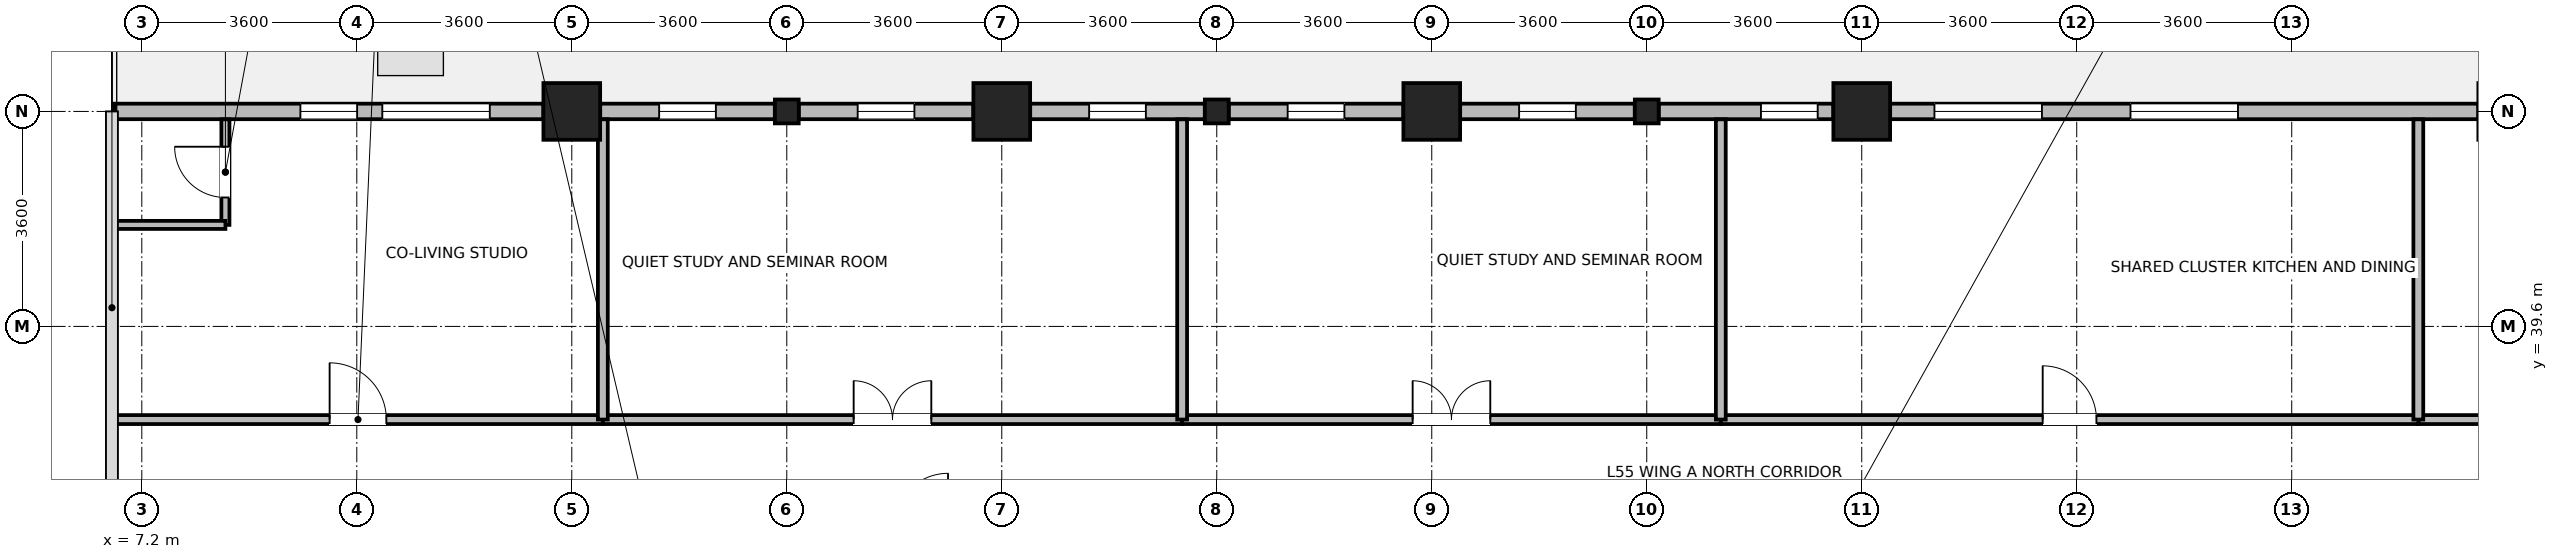
"""IFC4 building model, lengths in metres.
Left out: names, types, materials, properties, quantities, classifications, styles, units other than length and angle.
Written with IfcOpenShell. Run it as: python <this file> out.ifc"""

import sys

from ifc_helpers import new_model, si_unit, direction, frame, frame_2d, origin, origin_2d, place, context, subcontext, project, spatial, rectangle, i_section, extrude, source, transform, mapped, element, fill, save


model = new_model("IFC4")
c1 = context("Model", 3, precision=1e-05, world=origin(), true_north=direction((0.0, 1.0)))
c2 = subcontext(c1, "Body", "Model", "MODEL_VIEW")
j1 = project(units=[si_unit("LENGTHUNIT", "METRE"), si_unit("PLANEANGLEUNIT", "RADIAN")], contexts=[c1])
p1 = place(None, origin())
s1 = spatial("IfcSite", under=j1, at=p1, CompositionType="ELEMENT")
p2 = place(p1, origin())
s2 = spatial("IfcBuilding", under=s1, at=p2, CompositionType="ELEMENT")
p3 = place(p2, frame((0.0, 0.0, 216.6)))
s3 = spatial("IfcBuildingStorey", under=s2, at=p3, CompositionType="ELEMENT", Elevation=216.6)
m1 = source(origin(), c2, "Body", "SweptSolid", [
    extrude(rectangle(XDim=0.95, YDim=0.95, at=origin_2d()), origin(), (0.0, 0.0, 1.0), 3.7),
])
for number, where, z_axis, x_axis in (
    (1, (14.4, 43.2, 0.0), (0.0, 0.0, 1.0), (1.0, 0.0, 0.0)),
    (2, (21.6, 43.2, 0.0), (0.0, 0.0, 1.0), (1.0, 0.0, 0.0)),
    (3, (28.8, 43.2, 0.0), (0.0, 0.0, 1.0), (1.0, 0.0, 0.0)),
    (4, (36.0, 43.2, 0.0), (0.0, 0.0, 1.0), (1.0, 0.0, 0.0)),
):
    element("IfcColumn", number, at=place(p3, frame(where, z_axis=z_axis, x_axis=x_axis)), inside=s3, PredefinedType="COLUMN", context=c2, shape_type="MappedRepresentation", body=[
        mapped(m1, transform((0.0, 0.0, 0.0), x_axis=(1.0, 0.0, 0.0), y_axis=(0.0, 1.0, 0.0), z_axis=(0.0, 0.0, 1.0), scale=1.0)),
    ])
m2 = source(origin(), c2, "Body", "SweptSolid", [
    extrude(i_section(OverallWidth=0.399, OverallDepth=0.4, WebThickness=0.017, FlangeThickness=0.023, FilletRadius=0.015, at=origin_2d()), origin(), (0.0, 0.0, 1.0), 3.7),
])
for number, where, z_axis, x_axis in (
    (5, (18.0, 43.2, 0.0), (0.0, 0.0, 1.0), (1.0, 0.0, 0.0)),
    (6, (25.2, 43.2, 0.0), (0.0, 0.0, 1.0), (1.0, 0.0, 0.0)),
    (7, (32.4, 43.2, 0.0), (0.0, 0.0, 1.0), (1.0, 0.0, 0.0)),
):
    element("IfcColumn", number, at=place(p3, frame(where, z_axis=z_axis, x_axis=x_axis)), inside=s3, PredefinedType="COLUMN", context=c2, shape_type="MappedRepresentation", body=[
        mapped(m2, transform((0.0, 0.0, 0.0), x_axis=(1.0, 0.0, 0.0), y_axis=(0.0, 1.0, 0.0), z_axis=(0.0, 0.0, 1.0), scale=1.0)),
    ])
p4 = place(p3, frame((36.476, 43.2, 0.0), z_axis=(0.0, 0.0, 1.0), x_axis=(1.0, 0.0, 0.0)))
e8 = element("IfcWall", 8, at=p4, inside=s3, PredefinedType="STANDARD", context=c2, shape_type="SweptSolid", body=[
    extrude(rectangle(XDim=9.848, YDim=0.26, at=frame_2d((4.924, 0.0))), origin(), (0.0, 0.0, 1.0), 3.05),
])
p5 = place(p4, frame((0.741, 0.0, 0.85)))
e9 = element("IfcOpeningElement", 9, at=p5, cuts=e8, PredefinedType="OPENING", context=c2, shape_type="SweptSolid", body=[
    extrude(rectangle(XDim=1.8, YDim=1.85, at=frame_2d((0.9, 0.925))), frame((0.0, 0.14, 0.0), z_axis=(0.0, -1.0, 0.0), x_axis=(1.0, 0.0, 0.0)), (0.0, 0.0, 1.0), 0.28),
])
p6 = place(p4, frame((4.024, 0.0, 0.85)))
e10 = element("IfcOpeningElement", 10, at=p6, cuts=e8, PredefinedType="OPENING", context=c2, shape_type="SweptSolid", body=[
    extrude(rectangle(XDim=1.8, YDim=1.85, at=frame_2d((0.9, 0.925))), frame((0.0, 0.14, 0.0), z_axis=(0.0, -1.0, 0.0), x_axis=(1.0, 0.0, 0.0)), (0.0, 0.0, 1.0), 0.28),
])
p7 = place(p3, frame((32.601, 43.2, 0.0), z_axis=(0.0, 0.0, 1.0), x_axis=(1.0, 0.0, 0.0)))
e11 = element("IfcWall", 11, at=p7, inside=s3, PredefinedType="STANDARD", context=c2, shape_type="SweptSolid", body=[
    extrude(rectangle(XDim=2.923, YDim=0.26, at=frame_2d((1.462, 0.0))), origin(), (0.0, 0.0, 1.0), 3.05),
])
p8 = place(p7, frame((1.712, 0.0, 0.85)))
e12 = element("IfcOpeningElement", 12, at=p8, cuts=e11, PredefinedType="OPENING", context=c2, shape_type="SweptSolid", body=[
    extrude(rectangle(XDim=0.95, YDim=1.75, at=frame_2d((0.475, 0.875))), frame((0.0, 0.14, 0.0), z_axis=(0.0, -1.0, 0.0), x_axis=(1.0, 0.0, 0.0)), (0.0, 0.0, 1.0), 0.28),
])
p9 = place(p3, frame((29.276, 43.2, 0.0), z_axis=(0.0, 0.0, 1.0), x_axis=(1.0, 0.0, 0.0)))
e13 = element("IfcWall", 13, at=p9, inside=s3, PredefinedType="STANDARD", context=c2, shape_type="SweptSolid", body=[
    extrude(rectangle(XDim=2.924, YDim=0.26, at=frame_2d((1.462, 0.0))), origin(), (0.0, 0.0, 1.0), 3.05),
])
p10 = place(p9, frame((0.987, 0.0, 0.85)))
e14 = element("IfcOpeningElement", 14, at=p10, cuts=e13, PredefinedType="OPENING", context=c2, shape_type="SweptSolid", body=[
    extrude(rectangle(XDim=0.95, YDim=1.75, at=frame_2d((0.475, 0.875))), frame((0.0, 0.14, 0.0), z_axis=(0.0, -1.0, 0.0), x_axis=(1.0, 0.0, 0.0)), (0.0, 0.0, 1.0), 0.28),
])
p11 = place(p3, frame((25.4, 43.2, 0.0), z_axis=(0.0, 0.0, 1.0), x_axis=(1.0, 0.0, 0.0)))
e15 = element("IfcWall", 15, at=p11, inside=s3, PredefinedType="STANDARD", context=c2, shape_type="SweptSolid", body=[
    extrude(rectangle(XDim=2.924, YDim=0.26, at=frame_2d((1.462, 0.0))), origin(), (0.0, 0.0, 1.0), 3.05),
])
p12 = place(p11, frame((0.987, 0.0, 0.85)))
e16 = element("IfcOpeningElement", 16, at=p12, cuts=e15, PredefinedType="OPENING", context=c2, shape_type="SweptSolid", body=[
    extrude(rectangle(XDim=0.95, YDim=1.75, at=frame_2d((0.475, 0.875))), frame((0.0, 0.14, 0.0), z_axis=(0.0, -1.0, 0.0), x_axis=(1.0, 0.0, 0.0)), (0.0, 0.0, 1.0), 0.28),
])
p13 = place(p3, frame((22.076, 43.2, 0.0), z_axis=(0.0, 0.0, 1.0), x_axis=(1.0, 0.0, 0.0)))
e17 = element("IfcWall", 17, at=p13, inside=s3, PredefinedType="STANDARD", context=c2, shape_type="SweptSolid", body=[
    extrude(rectangle(XDim=2.924, YDim=0.26, at=frame_2d((1.462, 0.0))), origin(), (0.0, 0.0, 1.0), 3.05),
])
p14 = place(p13, frame((0.987, 0.0, 0.85)))
e18 = element("IfcOpeningElement", 18, at=p14, cuts=e17, PredefinedType="OPENING", context=c2, shape_type="SweptSolid", body=[
    extrude(rectangle(XDim=0.95, YDim=1.75, at=frame_2d((0.475, 0.875))), frame((0.0, 0.14, 0.0), z_axis=(0.0, -1.0, 0.0), x_axis=(1.0, 0.0, 0.0)), (0.0, 0.0, 1.0), 0.28),
])
p15 = place(p3, frame((18.2, 43.2, 0.0), z_axis=(0.0, 0.0, 1.0), x_axis=(1.0, 0.0, 0.0)))
e19 = element("IfcWall", 19, at=p15, inside=s3, PredefinedType="STANDARD", context=c2, shape_type="SweptSolid", body=[
    extrude(rectangle(XDim=2.924, YDim=0.26, at=frame_2d((1.462, 0.0))), origin(), (0.0, 0.0, 1.0), 3.05),
])
p16 = place(p15, frame((0.987, 0.0, 0.85)))
e20 = element("IfcOpeningElement", 20, at=p16, cuts=e19, PredefinedType="OPENING", context=c2, shape_type="SweptSolid", body=[
    extrude(rectangle(XDim=0.95, YDim=1.75, at=frame_2d((0.475, 0.875))), frame((0.0, 0.14, 0.0), z_axis=(0.0, -1.0, 0.0), x_axis=(1.0, 0.0, 0.0)), (0.0, 0.0, 1.0), 0.28),
])
p17 = place(p3, frame((14.876, 43.2, 0.0), z_axis=(0.0, 0.0, 1.0), x_axis=(1.0, 0.0, 0.0)))
e21 = element("IfcWall", 21, at=p17, inside=s3, PredefinedType="STANDARD", context=c2, shape_type="SweptSolid", body=[
    extrude(rectangle(XDim=2.924, YDim=0.26, at=frame_2d((1.462, 0.0))), origin(), (0.0, 0.0, 1.0), 3.05),
])
p18 = place(p17, frame((0.987, 0.0, 0.85)))
e22 = element("IfcOpeningElement", 22, at=p18, cuts=e21, PredefinedType="OPENING", context=c2, shape_type="SweptSolid", body=[
    extrude(rectangle(XDim=0.95, YDim=1.75, at=frame_2d((0.475, 0.875))), frame((0.0, 0.14, 0.0), z_axis=(0.0, -1.0, 0.0), x_axis=(1.0, 0.0, 0.0)), (0.0, 0.0, 1.0), 0.28),
])
p19 = place(p3, frame((6.737, 43.2, 0.0), z_axis=(0.0, 0.0, 1.0), x_axis=(1.0, 0.0, 0.0)))
e23 = element("IfcWall", 23, at=p19, inside=s3, PredefinedType="STANDARD", context=c2, shape_type="SweptSolid", body=[
    extrude(rectangle(XDim=7.187, YDim=0.26, at=frame_2d((3.594, 0.0))), origin(), (0.0, 0.0, 1.0), 3.45),
])
p20 = place(p19, frame((4.49, 0.0, 0.85)))
e24 = element("IfcOpeningElement", 24, at=p20, cuts=e23, PredefinedType="OPENING", context=c2, shape_type="SweptSolid", body=[
    extrude(rectangle(XDim=1.8, YDim=1.85, at=frame_2d((0.9, 0.925))), frame((0.0, 0.14, 0.0), z_axis=(0.0, -1.0, 0.0), x_axis=(1.0, 0.0, 0.0)), (0.0, 0.0, 1.0), 0.28),
])
p21 = place(p19, frame((3.118, 0.0, 0.85)))
e25 = element("IfcOpeningElement", 25, at=p21, cuts=e23, PredefinedType="OPENING", context=c2, shape_type="SweptSolid", body=[
    extrude(rectangle(XDim=0.95, YDim=1.75, at=frame_2d((0.475, 0.875))), frame((0.0, 0.14, 0.0), z_axis=(0.0, -1.0, 0.0), x_axis=(1.0, 0.0, 0.0)), (0.0, 0.0, 1.0), 0.28),
])
p22 = place(p3, frame((8.6, 41.3, 0.0), z_axis=(0.0, 0.0, 1.0), x_axis=(0.0, 1.0, 0.0)))
e26 = element("IfcWall", 26, at=p22, inside=s3, PredefinedType="PARTITIONING", context=c2, shape_type="SweptSolid", body=[
    extrude(rectangle(XDim=1.768, YDim=0.135, at=frame_2d((0.884, 0.0))), origin(), (0.0, 0.0, 1.0), 3.45),
])
p23 = place(p22, frame((0.459, 0.0, 0.0)))
e27 = element("IfcOpeningElement", 27, at=p23, cuts=e26, PredefinedType="OPENING", context=c2, shape_type="SweptSolid", body=[
    extrude(rectangle(XDim=0.85, YDim=2.04, at=frame_2d((0.425, 1.02))), frame((0.0, 0.078, 0.0), z_axis=(0.0, -1.0, 0.0), x_axis=(1.0, 0.0, 0.0)), (0.0, 0.0, 1.0), 0.155),
])
p24 = place(p3, frame((6.72, 41.3, 0.0), z_axis=(0.0, 0.0, 1.0), x_axis=(1.0, 0.0, 0.0)))
e28 = element("IfcWall", 28, at=p24, inside=s3, PredefinedType="PARTITIONING", context=c2, shape_type="SweptSolid", body=[
    extrude(rectangle(XDim=1.88, YDim=0.135, at=frame_2d((0.94, 0.0))), origin(), (0.0, 0.0, 1.0), 3.45),
])
p25 = place(p3, frame((45.32, 38.04, 0.0), z_axis=(0.0, 0.0, 1.0), x_axis=(1.0, 0.0, 0.0)))
e29 = element("IfcWall", 29, at=p25, inside=s3, PredefinedType="PARTITIONING", context=c2, shape_type="SweptSolid", body=[
    extrude(rectangle(XDim=13.52, YDim=0.15, at=frame_2d((6.76, 0.0))), origin(), (0.0, 0.0, 1.0), 3.45),
])
p26 = place(p25, frame((6.11, 0.0, 0.0)))
e30 = element("IfcOpeningElement", 30, at=p26, cuts=e29, PredefinedType="OPENING", context=c2, shape_type="SweptSolid", body=[
    extrude(rectangle(XDim=1.3, YDim=2.12, at=frame_2d((0.65, 1.06))), frame((0.0, 0.085, 0.0), z_axis=(0.0, -1.0, 0.0), x_axis=(1.0, 0.0, 0.0)), (0.0, 0.0, 1.0), 0.17),
])
p27 = place(p3, frame((33.64, 38.04, 0.0), z_axis=(0.0, 0.0, 1.0), x_axis=(1.0, 0.0, 0.0)))
e31 = element("IfcWall", 31, at=p27, inside=s3, PredefinedType="PARTITIONING", context=c2, shape_type="SweptSolid", body=[
    extrude(rectangle(XDim=11.68, YDim=0.15, at=frame_2d((5.84, 0.0))), origin(), (0.0, 0.0, 1.0), 3.45),
])
p28 = place(p27, frame((5.39, 0.0, 0.0)))
e32 = element("IfcOpeningElement", 32, at=p28, cuts=e31, PredefinedType="OPENING", context=c2, shape_type="SweptSolid", body=[
    extrude(rectangle(XDim=0.9, YDim=2.08, at=frame_2d((0.45, 1.04))), frame((0.0, 0.085, 0.0), z_axis=(0.0, -1.0, 0.0), x_axis=(1.0, 0.0, 0.0)), (0.0, 0.0, 1.0), 0.17),
])
p29 = place(p3, frame((14.92, 38.04, 0.0), z_axis=(0.0, 0.0, 1.0), x_axis=(1.0, 0.0, 0.0)))
e33 = element("IfcWall", 33, at=p29, inside=s3, PredefinedType="PARTITIONING", context=c2, shape_type="SweptSolid", body=[
    extrude(rectangle(XDim=9.7, YDim=0.15, at=frame_2d((4.85, 0.0))), origin(), (0.0, 0.0, 1.0), 3.45),
])
p30 = place(p29, frame((4.2, 0.0, 0.0)))
e34 = element("IfcOpeningElement", 34, at=p30, cuts=e33, PredefinedType="OPENING", context=c2, shape_type="SweptSolid", body=[
    extrude(rectangle(XDim=1.3, YDim=2.12, at=frame_2d((0.65, 1.06))), frame((0.0, 0.085, 0.0), z_axis=(0.0, -1.0, 0.0), x_axis=(1.0, 0.0, 0.0)), (0.0, 0.0, 1.0), 0.17),
])
p31 = place(p3, frame((24.62, 38.04, 0.0), z_axis=(0.0, 0.0, 1.0), x_axis=(1.0, 0.0, 0.0)))
e35 = element("IfcWall", 35, at=p31, inside=s3, PredefinedType="PARTITIONING", context=c2, shape_type="SweptSolid", body=[
    extrude(rectangle(XDim=9.02, YDim=0.15, at=frame_2d((4.51, 0.0))), origin(), (0.0, 0.0, 1.0), 3.45),
])
p32 = place(p31, frame((3.86, 0.0, 0.0)))
e36 = element("IfcOpeningElement", 36, at=p32, cuts=e35, PredefinedType="OPENING", context=c2, shape_type="SweptSolid", body=[
    extrude(rectangle(XDim=1.3, YDim=2.12, at=frame_2d((0.65, 1.06))), frame((0.0, 0.085, 0.0), z_axis=(0.0, -1.0, 0.0), x_axis=(1.0, 0.0, 0.0)), (0.0, 0.0, 1.0), 0.17),
])
p33 = place(p3, frame((6.72, 38.04, 0.0), z_axis=(0.0, 0.0, 1.0), x_axis=(1.0, 0.0, 0.0)))
e37 = element("IfcWall", 37, at=p33, inside=s3, PredefinedType="PARTITIONING", context=c2, shape_type="SweptSolid", body=[
    extrude(rectangle(XDim=8.2, YDim=0.15, at=frame_2d((4.1, 0.0))), origin(), (0.0, 0.0, 1.0), 3.45),
])
p34 = place(p33, frame((3.625, 0.0, 0.0)))
e38 = element("IfcOpeningElement", 38, at=p34, cuts=e37, PredefinedType="OPENING", context=c2, shape_type="SweptSolid", body=[
    extrude(rectangle(XDim=0.95, YDim=2.1, at=frame_2d((0.475, 1.05))), frame((0.0, 0.085, 0.0), z_axis=(0.0, -1.0, 0.0), x_axis=(1.0, 0.0, 0.0)), (0.0, 0.0, 1.0), 0.17),
])
for number, where, z_axis, x_axis in (
    (39, (14.92, 38.04, 0.0), (0.0, 0.0, 1.0), (0.0, 1.0, 0.0)),
    (40, (24.62, 38.04, 0.0), (0.0, 0.0, 1.0), (0.0, 1.0, 0.0)),
    (41, (33.64, 38.04, 0.0), (0.0, 0.0, 1.0), (0.0, 1.0, 0.0)),
    (42, (45.32, 38.04, 0.0), (0.0, 0.0, 1.0), (0.0, 1.0, 0.0)),
):
    element("IfcWall", number, at=place(p3, frame(where, z_axis=z_axis, x_axis=x_axis)), inside=s3, PredefinedType="PARTITIONING", context=c2, shape_type="SweptSolid", body=[
        extrude(rectangle(XDim=5.028, YDim=0.165, at=frame_2d((2.514, 0.0))), origin(), (0.0, 0.0, 1.0), 3.45),
    ])
p35 = place(p5, origin())
e43 = element("IfcWindow", 43, at=p35, inside=s3, PartitioningType="SINGLE_PANEL", PredefinedType="WINDOW", context=c2, shape_type="SweptSolid", body=[
    extrude(rectangle(XDim=1.8, YDim=1.85, at=frame_2d((0.9, 0.925))), frame((0.0, 0.03, 0.0), z_axis=(0.0, -1.0, 0.0), x_axis=(1.0, 0.0, 0.0)), (0.0, 0.0, 1.0), 0.06),
])
fill(e9, e43)
p36 = place(p6, origin())
e44 = element("IfcWindow", 44, at=p36, inside=s3, PartitioningType="SINGLE_PANEL", PredefinedType="WINDOW", context=c2, shape_type="SweptSolid", body=[
    extrude(rectangle(XDim=1.8, YDim=1.85, at=frame_2d((0.9, 0.925))), frame((0.0, 0.03, 0.0), z_axis=(0.0, -1.0, 0.0), x_axis=(1.0, 0.0, 0.0)), (0.0, 0.0, 1.0), 0.06),
])
fill(e10, e44)
p37 = place(p8, origin())
e45 = element("IfcWindow", 45, at=p37, inside=s3, PartitioningType="SINGLE_PANEL", PredefinedType="WINDOW", context=c2, shape_type="SweptSolid", body=[
    extrude(rectangle(XDim=0.95, YDim=1.75, at=frame_2d((0.475, 0.875))), frame((0.0, 0.03, 0.0), z_axis=(0.0, -1.0, 0.0), x_axis=(1.0, 0.0, 0.0)), (0.0, 0.0, 1.0), 0.06),
])
fill(e12, e45)
p38 = place(p10, origin())
e46 = element("IfcWindow", 46, at=p38, inside=s3, PartitioningType="SINGLE_PANEL", PredefinedType="WINDOW", context=c2, shape_type="SweptSolid", body=[
    extrude(rectangle(XDim=0.95, YDim=1.75, at=frame_2d((0.475, 0.875))), frame((0.0, 0.03, 0.0), z_axis=(0.0, -1.0, 0.0), x_axis=(1.0, 0.0, 0.0)), (0.0, 0.0, 1.0), 0.06),
])
fill(e14, e46)
p39 = place(p12, origin())
e47 = element("IfcWindow", 47, at=p39, inside=s3, PartitioningType="SINGLE_PANEL", PredefinedType="WINDOW", context=c2, shape_type="SweptSolid", body=[
    extrude(rectangle(XDim=0.95, YDim=1.75, at=frame_2d((0.475, 0.875))), frame((0.0, 0.03, 0.0), z_axis=(0.0, -1.0, 0.0), x_axis=(1.0, 0.0, 0.0)), (0.0, 0.0, 1.0), 0.06),
])
fill(e16, e47)
p40 = place(p14, origin())
e48 = element("IfcWindow", 48, at=p40, inside=s3, PartitioningType="SINGLE_PANEL", PredefinedType="WINDOW", context=c2, shape_type="SweptSolid", body=[
    extrude(rectangle(XDim=0.95, YDim=1.75, at=frame_2d((0.475, 0.875))), frame((0.0, 0.03, 0.0), z_axis=(0.0, -1.0, 0.0), x_axis=(1.0, 0.0, 0.0)), (0.0, 0.0, 1.0), 0.06),
])
fill(e18, e48)
p41 = place(p16, origin())
e49 = element("IfcWindow", 49, at=p41, inside=s3, PartitioningType="SINGLE_PANEL", PredefinedType="WINDOW", context=c2, shape_type="SweptSolid", body=[
    extrude(rectangle(XDim=0.95, YDim=1.75, at=frame_2d((0.475, 0.875))), frame((0.0, 0.03, 0.0), z_axis=(0.0, -1.0, 0.0), x_axis=(1.0, 0.0, 0.0)), (0.0, 0.0, 1.0), 0.06),
])
fill(e20, e49)
p42 = place(p18, origin())
e50 = element("IfcWindow", 50, at=p42, inside=s3, PartitioningType="SINGLE_PANEL", PredefinedType="WINDOW", context=c2, shape_type="SweptSolid", body=[
    extrude(rectangle(XDim=0.95, YDim=1.75, at=frame_2d((0.475, 0.875))), frame((0.0, 0.03, 0.0), z_axis=(0.0, -1.0, 0.0), x_axis=(1.0, 0.0, 0.0)), (0.0, 0.0, 1.0), 0.06),
])
fill(e22, e50)
p43 = place(p20, origin())
e51 = element("IfcWindow", 51, at=p43, inside=s3, PartitioningType="SINGLE_PANEL", PredefinedType="WINDOW", context=c2, shape_type="SweptSolid", body=[
    extrude(rectangle(XDim=1.8, YDim=1.85, at=frame_2d((0.9, 0.925))), frame((0.0, 0.03, 0.0), z_axis=(0.0, -1.0, 0.0), x_axis=(1.0, 0.0, 0.0)), (0.0, 0.0, 1.0), 0.06),
])
fill(e24, e51)
p44 = place(p21, origin())
e52 = element("IfcWindow", 52, at=p44, inside=s3, PartitioningType="SINGLE_PANEL", PredefinedType="WINDOW", context=c2, shape_type="SweptSolid", body=[
    extrude(rectangle(XDim=0.95, YDim=1.75, at=frame_2d((0.475, 0.875))), frame((0.0, 0.03, 0.0), z_axis=(0.0, -1.0, 0.0), x_axis=(1.0, 0.0, 0.0)), (0.0, 0.0, 1.0), 0.06),
])
fill(e25, e52)
p45 = place(p23, origin())
e53 = element("IfcDoor", 53, at=p45, inside=s3, OperationType="SINGLE_SWING_RIGHT", PredefinedType="DOOR", context=c2, shape_type="SweptSolid", body=[
    extrude(rectangle(XDim=0.85, YDim=2.04, at=frame_2d((0.425, 1.02))), frame((0.0, 0.025, 0.0), z_axis=(0.0, -1.0, 0.0), x_axis=(1.0, 0.0, 0.0)), (0.0, 0.0, 1.0), 0.05),
])
fill(e27, e53)
p46 = place(p28, origin())
e54 = element("IfcDoor", 54, at=p46, inside=s3, OperationType="SINGLE_SWING_LEFT", PredefinedType="DOOR", context=c2, shape_type="SweptSolid", body=[
    extrude(rectangle(XDim=0.9, YDim=2.08, at=frame_2d((0.45, 1.04))), frame((0.0, 0.025, 0.0), z_axis=(0.0, -1.0, 0.0), x_axis=(1.0, 0.0, 0.0)), (0.0, 0.0, 1.0), 0.05),
])
fill(e32, e54)
p47 = place(p30, origin())
e55 = element("IfcDoor", 55, at=p47, inside=s3, OperationType="DOUBLE_DOOR_SINGLE_SWING", PredefinedType="DOOR", context=c2, shape_type="SweptSolid", body=[
    extrude(rectangle(XDim=1.3, YDim=2.12, at=frame_2d((0.65, 1.06))), frame((0.0, 0.025, 0.0), z_axis=(0.0, -1.0, 0.0), x_axis=(1.0, 0.0, 0.0)), (0.0, 0.0, 1.0), 0.05),
])
fill(e34, e55)
p48 = place(p32, origin())
e56 = element("IfcDoor", 56, at=p48, inside=s3, OperationType="DOUBLE_DOOR_SINGLE_SWING", PredefinedType="DOOR", context=c2, shape_type="SweptSolid", body=[
    extrude(rectangle(XDim=1.3, YDim=2.12, at=frame_2d((0.65, 1.06))), frame((0.0, 0.025, 0.0), z_axis=(0.0, -1.0, 0.0), x_axis=(1.0, 0.0, 0.0)), (0.0, 0.0, 1.0), 0.05),
])
fill(e36, e56)
p49 = place(p34, origin())
e57 = element("IfcDoor", 57, at=p49, inside=s3, OperationType="SINGLE_SWING_LEFT", PredefinedType="DOOR", context=c2, shape_type="SweptSolid", body=[
    extrude(rectangle(XDim=0.95, YDim=2.1, at=frame_2d((0.475, 1.05))), frame((0.0, 0.025, 0.0), z_axis=(0.0, -1.0, 0.0), x_axis=(1.0, 0.0, 0.0)), (0.0, 0.0, 1.0), 0.05),
])
fill(e38, e57)
save(model, sys.argv[1])
